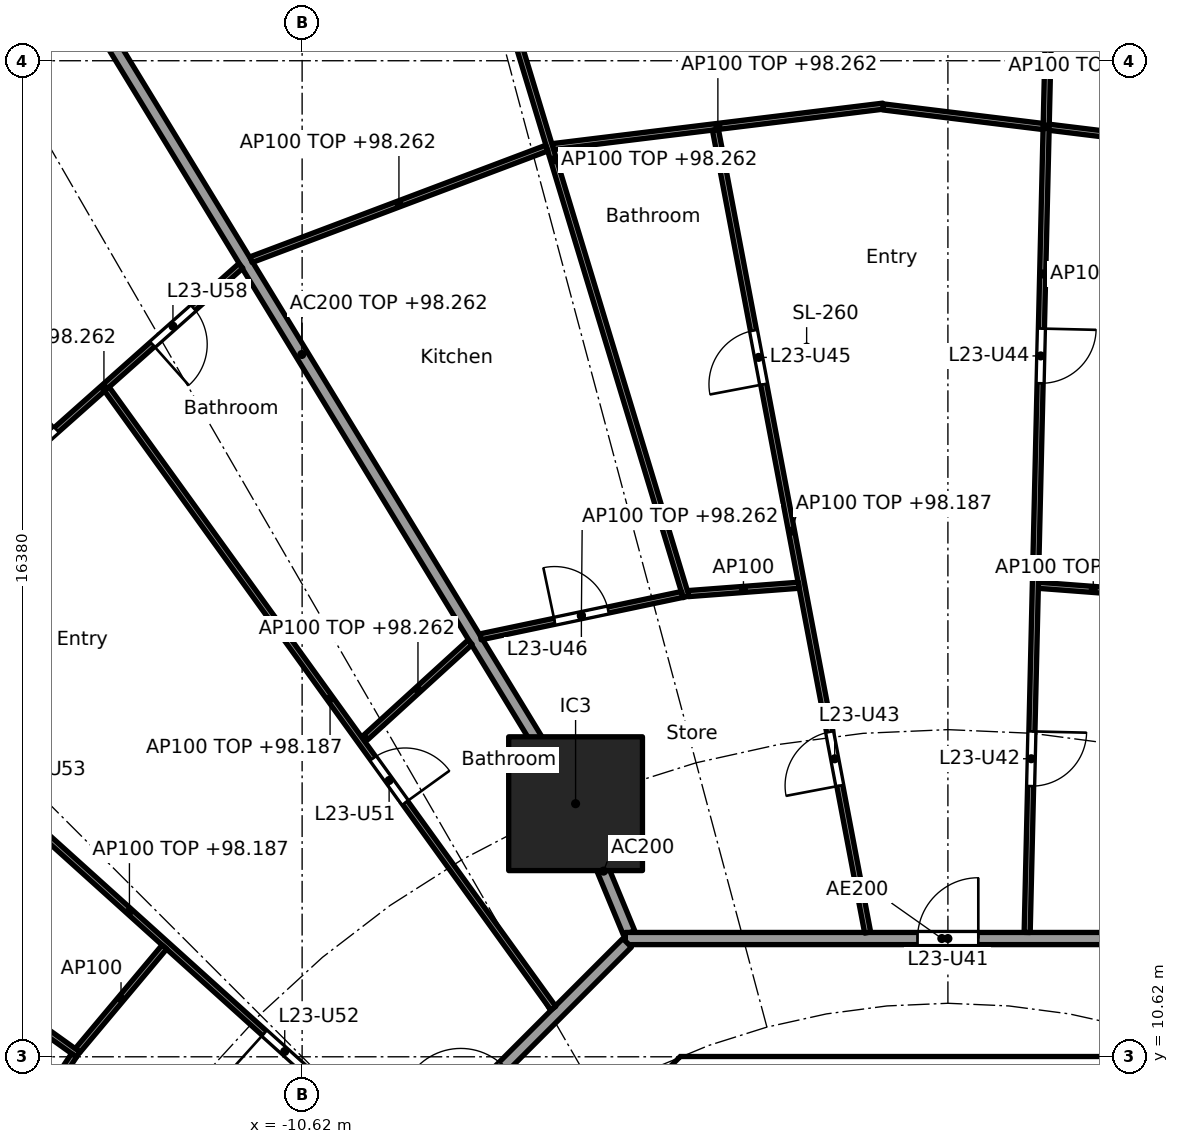
"""IFC4 building model, lengths in metres.
Left out: names, types, materials, properties, quantities, classifications, styles, units other than length and angle.
Written with IfcOpenShell. Run it as: python <this file> out.ifc"""

import sys

from ifc_helpers import new_model, si_unit, direction, frame, frame_2d, origin, origin_2d, place, context, subcontext, project, spatial, polyline, rectangle, outline, extrude, element, fill, save


model = new_model("IFC4")
c1 = context("Model", 3, precision=1e-05, world=origin(), true_north=direction((0.0, 1.0)))
c2 = subcontext(c1, "Body", "Model", "MODEL_VIEW")
j1 = project(units=[si_unit("LENGTHUNIT", "METRE"), si_unit("PLANEANGLEUNIT", "RADIAN")], contexts=[c1])
p1 = place(None, origin())
s1 = spatial("IfcSite", under=j1, at=p1, CompositionType="ELEMENT")
p2 = place(p1, origin())
s2 = spatial("IfcBuilding", under=s1, at=p2, CompositionType="ELEMENT")
p3 = place(p2, frame((0.0, 0.0, 95.5)))
s3 = spatial("IfcBuildingStorey", under=s2, at=p3, CompositionType="ELEMENT", Elevation=95.5)
p4 = place(p3, frame((-6.123, 14.782, 0.0), z_axis=(0.0, 0.0, 1.0), x_axis=(1.0, 0.0, 0.0)))
e1 = element("IfcColumn", 1, at=p4, inside=s3, PredefinedType="COLUMN", context=c2, shape_type="SweptSolid", body=[
    extrude(rectangle(XDim=2.2, YDim=2.2, at=origin_2d()), origin(), (0.0, 0.0, 1.0), 3.7),
])
p5 = place(p3, origin())
e2 = element("IfcWall", 2, at=p5, inside=s3, PredefinedType="SHEAR", context=c2, shape_type="SweptSolid", body=[
    extrude(outline(polyline([(-4.152, 10.025), (-4.401, 9.776), (-4.825, 10.2), (-4.401, 10.625), (4.401, 10.625), (4.825, 10.2), (4.401, 9.776), (4.152, 10.025), (-4.152, 10.025)])), origin(), (0.0, 0.0, 1.0), 3.44),
])
p6 = place(p3, frame((-5.243, 12.657, 0.0), z_axis=(0.0, 0.0, 1.0), x_axis=(-0.38273085373, 0.923859888513, 0.0)))
e3 = element("IfcWall", 3, at=p6, inside=s3, PredefinedType="PARTITIONING", context=c2, shape_type="SweptSolid", body=[
    extrude(rectangle(XDim=2.199, YDim=0.2, at=frame_2d((1.1, 0.0))), origin(), (0.0, 0.0, 1.0), 3.44),
])
p7 = place(p3, frame((-6.149, 14.825, 0.0), z_axis=(0.0, 0.0, 1.0), x_axis=(-0.520412862249, 0.853914780763, 0.0)))
e4 = element("IfcWall", 4, at=p7, inside=s3, PredefinedType="PARTITIONING", context=c2, shape_type="SweptSolid", body=[
    extrude(rectangle(XDim=17.202, YDim=0.2, at=frame_2d((8.601, 0.0))), origin(), (0.0, 0.0, 1.0), 2.762),
])
p8 = place(p3, frame((5.104, 12.565, 0.0), z_axis=(0.0, 0.0, 1.0), x_axis=(-1.0, 0.0, 0.0)))
e5 = element("IfcWall", 5, at=p8, inside=s3, PredefinedType="PARTITIONING", context=c2, shape_type="SweptSolid", body=[
    extrude(rectangle(XDim=10.409, YDim=0.2, at=frame_2d((5.205, 0.0))), origin(), (0.0, 0.0, 1.0), 3.44),
])
p9 = place(p8, frame((4.604, 0.0, 0.0)))
e6 = element("IfcOpeningElement", 6, at=p9, cuts=e5, PredefinedType="OPENING", context=c2, shape_type="SweptSolid", body=[
    extrude(rectangle(XDim=1.0, YDim=2.1, at=frame_2d((0.5, 1.05))), frame((0.0, 0.11, 0.0), z_axis=(0.0, -1.0, 0.0), x_axis=(1.0, 0.0, 0.0)), (0.0, 0.0, 1.0), 0.22),
])
p10 = place(p3, frame((-5.275, 12.494, 0.0), z_axis=(0.0, 0.0, 1.0), x_axis=(-0.707106781187, -0.707106781187, 0.0)))
e7 = element("IfcWall", 7, at=p10, inside=s3, PredefinedType="PARTITIONING", context=c2, shape_type="SweptSolid", body=[
    extrude(rectangle(XDim=10.209, YDim=0.2, at=frame_2d((5.104, 0.0))), origin(), (0.0, 0.0, 1.0), 3.44),
])
p11 = place(p10, frame((2.87, 0.0, 0.0)))
e8 = element("IfcOpeningElement", 8, at=p11, cuts=e7, PredefinedType="OPENING", context=c2, shape_type="SweptSolid", body=[
    extrude(rectangle(XDim=1.0, YDim=2.1, at=frame_2d((0.5, 1.05))), frame((0.0, 0.11, 0.0), z_axis=(0.0, -1.0, 0.0), x_axis=(1.0, 0.0, 0.0)), (0.0, 0.0, 1.0), 0.22),
])
p12 = place(p3, frame((3.299, 18.237, 0.0), z_axis=(0.0, 0.0, 1.0), x_axis=(-0.997152920483, 0.075405922664, 0.0)))
e9 = element("IfcWall", 9, at=p12, inside=s3, PredefinedType="PARTITIONING", context=c2, shape_type="SweptSolid", body=[
    extrude(rectangle(XDim=1.823, YDim=0.1, at=frame_2d((0.911, 0.0))), origin(), (0.0, 0.0, 1.0), 2.762),
])
p13 = place(p3, frame((4.267, 25.587, 0.0), z_axis=(0.0, 0.0, 1.0), x_axis=(-0.992576206119, 0.121624319302, 0.0)))
e10 = element("IfcWall", 10, at=p13, inside=s3, PredefinedType="PARTITIONING", context=c2, shape_type="SweptSolid", body=[
    extrude(rectangle(XDim=5.374, YDim=0.1, at=frame_2d((2.687, 0.0))), origin(), (0.0, 0.0, 1.0), 2.762),
])
p14 = place(p3, frame((1.303, 12.665, 0.0), z_axis=(0.0, 0.0, 1.0), x_axis=(0.023564110689, 0.999722327793, 0.0)))
e11 = element("IfcWall", 11, at=p14, inside=s3, PredefinedType="PARTITIONING", context=c2, shape_type="SweptSolid", body=[
    extrude(rectangle(XDim=21.664, YDim=0.1, at=frame_2d((10.832, 0.0))), origin(), (0.0, 0.0, 1.0), 2.687),
])
p15 = place(p14, frame((2.407, 0.0, 0.0)))
e12 = element("IfcOpeningElement", 12, at=p15, cuts=e11, PredefinedType="OPENING", context=c2, shape_type="SweptSolid", body=[
    extrude(rectangle(XDim=0.9, YDim=2.1, at=frame_2d((0.45, 1.05))), frame((0.0, 0.06, 0.0), z_axis=(0.0, -1.0, 0.0), x_axis=(1.0, 0.0, 0.0)), (0.0, 0.0, 1.0), 0.12),
])
p16 = place(p14, frame((9.034, 0.0, 0.0)))
e13 = element("IfcOpeningElement", 13, at=p16, cuts=e11, PredefinedType="OPENING", context=c2, shape_type="SweptSolid", body=[
    extrude(rectangle(XDim=0.9, YDim=2.1, at=frame_2d((0.45, 1.05))), frame((0.0, 0.06, 0.0), z_axis=(0.0, -1.0, 0.0), x_axis=(1.0, 0.0, 0.0)), (0.0, 0.0, 1.0), 0.12),
])
p17 = place(p14, frame((17.009, 0.0, 0.0)))
e14 = element("IfcOpeningElement", 14, at=p17, cuts=e11, PredefinedType="OPENING", context=c2, shape_type="SweptSolid", body=[
    extrude(rectangle(XDim=0.9, YDim=2.1, at=frame_2d((0.45, 1.05))), frame((0.0, 0.06, 0.0), z_axis=(0.0, -1.0, 0.0), x_axis=(1.0, 0.0, 0.0)), (0.0, 0.0, 1.0), 0.12),
])
p18 = place(p3, frame((-1.066, 26.253, 0.0), z_axis=(0.0, 0.0, 1.0), x_axis=(-0.992574853421, -0.121635358166, 0.0)))
e15 = element("IfcWall", 15, at=p18, inside=s3, PredefinedType="PARTITIONING", context=c2, shape_type="SweptSolid", body=[
    extrude(rectangle(XDim=5.473, YDim=0.1, at=frame_2d((2.737, 0.0))), origin(), (0.0, 0.0, 1.0), 2.762),
])
p19 = place(p3, frame((-1.32, 12.663, 0.0), z_axis=(0.0, 0.0, 1.0), x_axis=(-0.186308855238, 0.982491226658, 0.0)))
e16 = element("IfcWall", 16, at=p19, inside=s3, PredefinedType="PARTITIONING", context=c2, shape_type="SweptSolid", body=[
    extrude(rectangle(XDim=13.437, YDim=0.1, at=frame_2d((6.719, 0.0))), origin(), (0.0, 0.0, 1.0), 2.687),
])
p20 = place(p19, frame((2.458, 0.0, 0.0)))
e17 = element("IfcOpeningElement", 17, at=p20, cuts=e16, PredefinedType="OPENING", context=c2, shape_type="SweptSolid", body=[
    extrude(rectangle(XDim=0.9, YDim=2.1, at=frame_2d((0.45, 1.05))), frame((0.0, 0.06, 0.0), z_axis=(0.0, -1.0, 0.0), x_axis=(1.0, 0.0, 0.0)), (0.0, 0.0, 1.0), 0.12),
])
p21 = place(p19, frame((9.177, 0.0, 0.0)))
e18 = element("IfcOpeningElement", 18, at=p21, cuts=e16, PredefinedType="OPENING", context=c2, shape_type="SweptSolid", body=[
    extrude(rectangle(XDim=0.9, YDim=2.1, at=frame_2d((0.45, 1.05))), frame((0.0, 0.06, 0.0), z_axis=(0.0, -1.0, 0.0), x_axis=(1.0, 0.0, 0.0)), (0.0, 0.0, 1.0), 0.12),
])
p22 = place(p3, frame((-2.453, 18.374, 0.0), z_axis=(0.0, 0.0, 1.0), x_axis=(-0.997153681897, -0.075395853197, 0.0)))
e19 = element("IfcWall", 19, at=p22, inside=s3, PredefinedType="PARTITIONING", context=c2, shape_type="SweptSolid", body=[
    extrude(rectangle(XDim=1.823, YDim=0.1, at=frame_2d((0.912, 0.0))), origin(), (0.0, 0.0, 1.0), 3.44),
])
p23 = place(p3, frame((-4.306, 18.185, 0.0), z_axis=(0.0, 0.0, 1.0), x_axis=(-0.290183838394, 0.956970919064, 0.0)))
e20 = element("IfcWall", 20, at=p23, inside=s3, PredefinedType="PARTITIONING", context=c2, shape_type="SweptSolid", body=[
    extrude(rectangle(XDim=15.015, YDim=0.1, at=frame_2d((7.508, 0.0))), origin(), (0.0, 0.0, 1.0), 2.762),
])
p24 = place(p23, frame((10.922, 0.0, 0.0)))
e21 = element("IfcOpeningElement", 21, at=p24, cuts=e20, PredefinedType="OPENING", context=c2, shape_type="SweptSolid", body=[
    extrude(rectangle(XDim=0.9, YDim=2.1, at=frame_2d((0.45, 1.05))), frame((0.0, 0.06, 0.0), z_axis=(0.0, -1.0, 0.0), x_axis=(1.0, 0.0, 0.0)), (0.0, 0.0, 1.0), 0.12),
])
p25 = place(p3, frame((-4.37, 18.223, 0.0), z_axis=(0.0, 0.0, 1.0), x_axis=(-0.978633053291, -0.205614559323, 0.0)))
e22 = element("IfcWall", 22, at=p25, inside=s3, PredefinedType="PARTITIONING", context=c2, shape_type="SweptSolid", body=[
    extrude(rectangle(XDim=3.387, YDim=0.1, at=frame_2d((1.694, 0.0))), origin(), (0.0, 0.0, 1.0), 2.762),
])
p26 = place(p25, frame((1.244, 0.0, 0.0)))
e23 = element("IfcOpeningElement", 23, at=p26, cuts=e22, PredefinedType="OPENING", context=c2, shape_type="SweptSolid", body=[
    extrude(rectangle(XDim=0.9, YDim=2.1, at=frame_2d((0.45, 1.05))), frame((0.0, 0.06, 0.0), z_axis=(0.0, -1.0, 0.0), x_axis=(1.0, 0.0, 0.0)), (0.0, 0.0, 1.0), 0.12),
])
p27 = place(p3, frame((-6.596, 25.563, 0.0), z_axis=(0.0, 0.0, 1.0), x_axis=(-0.935624838262, -0.352995980185, 0.0)))
e24 = element("IfcWall", 24, at=p27, inside=s3, PredefinedType="PARTITIONING", context=c2, shape_type="SweptSolid", body=[
    extrude(rectangle(XDim=5.199, YDim=0.1, at=frame_2d((2.6, 0.0))), origin(), (0.0, 0.0, 1.0), 2.762),
])
p28 = place(p3, frame((-7.857, 17.438, 0.0), z_axis=(0.0, 0.0, 1.0), x_axis=(-0.738883513135, -0.673833179665, 0.0)))
e25 = element("IfcWall", 25, at=p28, inside=s3, PredefinedType="PARTITIONING", context=c2, shape_type="SweptSolid", body=[
    extrude(rectangle(XDim=2.323, YDim=0.1, at=frame_2d((1.162, 0.0))), origin(), (0.0, 0.0, 1.0), 2.762),
])
p29 = place(p3, frame((-11.628, 23.626, 0.0), z_axis=(0.0, 0.0, 1.0), x_axis=(-0.747429444005, -0.664341197153, 0.0)))
e26 = element("IfcWall", 26, at=p29, inside=s3, PredefinedType="PARTITIONING", context=c2, shape_type="SweptSolid", body=[
    extrude(rectangle(XDim=6.024, YDim=0.1, at=frame_2d((3.012, 0.0))), origin(), (0.0, 0.0, 1.0), 2.762),
])
p30 = place(p29, frame((4.055, 0.0, 0.0)))
e27 = element("IfcOpeningElement", 27, at=p30, cuts=e26, PredefinedType="OPENING", context=c2, shape_type="SweptSolid", body=[
    extrude(rectangle(XDim=0.9, YDim=2.1, at=frame_2d((0.45, 1.05))), frame((0.0, 0.06, 0.0), z_axis=(0.0, -1.0, 0.0), x_axis=(1.0, 0.0, 0.0)), (0.0, 0.0, 1.0), 0.12),
])
p31 = place(p29, frame((1.043, 0.0, 0.0)))
e28 = element("IfcOpeningElement", 28, at=p31, cuts=e26, PredefinedType="OPENING", context=c2, shape_type="SweptSolid", body=[
    extrude(rectangle(XDim=0.9, YDim=2.1, at=frame_2d((0.45, 1.05))), frame((0.0, 0.06, 0.0), z_axis=(0.0, -1.0, 0.0), x_axis=(1.0, 0.0, 0.0)), (0.0, 0.0, 1.0), 0.12),
])
p32 = place(p3, frame((-6.49, 11.419, 0.0), z_axis=(0.0, 0.0, 1.0), x_axis=(-0.584832823883, 0.811153849839, 0.0)))
e29 = element("IfcWall", 29, at=p32, inside=s3, PredefinedType="PARTITIONING", context=c2, shape_type="SweptSolid", body=[
    extrude(rectangle(XDim=12.553, YDim=0.1, at=frame_2d((6.277, 0.0))), origin(), (0.0, 0.0, 1.0), 2.687),
])
p33 = place(p32, frame((4.166, 0.0, 0.0)))
e30 = element("IfcOpeningElement", 30, at=p33, cuts=e29, PredefinedType="OPENING", context=c2, shape_type="SweptSolid", body=[
    extrude(rectangle(XDim=0.9, YDim=2.1, at=frame_2d((0.45, 1.05))), frame((0.0, 0.06, 0.0), z_axis=(0.0, -1.0, 0.0), x_axis=(1.0, 0.0, 0.0)), (0.0, 0.0, 1.0), 0.12),
])
p34 = place(p3, frame((-8.959, 8.952, 0.0), z_axis=(0.0, 0.0, 1.0), x_axis=(-0.742679904999, 0.669646592398, 0.0)))
e31 = element("IfcWall", 31, at=p34, inside=s3, PredefinedType="PARTITIONING", context=c2, shape_type="SweptSolid", body=[
    extrude(rectangle(XDim=12.121, YDim=0.1, at=frame_2d((6.061, 0.0))), origin(), (0.0, 0.0, 1.0), 2.687),
])
p35 = place(p34, frame((2.172, 0.0, 0.0)))
e32 = element("IfcOpeningElement", 32, at=p35, cuts=e31, PredefinedType="OPENING", context=c2, shape_type="SweptSolid", body=[
    extrude(rectangle(XDim=0.9, YDim=2.1, at=frame_2d((0.45, 1.05))), frame((0.0, 0.06, 0.0), z_axis=(0.0, -1.0, 0.0), x_axis=(1.0, 0.0, 0.0)), (0.0, 0.0, 1.0), 0.12),
])
p36 = place(p34, frame((8.233, 0.0, 0.0)))
e33 = element("IfcOpeningElement", 33, at=p36, cuts=e31, PredefinedType="OPENING", context=c2, shape_type="SweptSolid", body=[
    extrude(rectangle(XDim=0.9, YDim=2.1, at=frame_2d((0.45, 1.05))), frame((0.0, 0.06, 0.0), z_axis=(0.0, -1.0, 0.0), x_axis=(1.0, 0.0, 0.0)), (0.0, 0.0, 1.0), 0.12),
])
p37 = place(p3, frame((-12.885, 12.425, 0.0), z_axis=(0.0, 0.0, 1.0), x_axis=(-0.642551826067, -0.766242227248, 0.0)))
e34 = element("IfcWall", 34, at=p37, inside=s3, PredefinedType="PARTITIONING", context=c2, shape_type="SweptSolid", body=[
    extrude(rectangle(XDim=2.219, YDim=0.1, at=frame_2d((1.109, 0.0))), origin(), (0.0, 0.0, 1.0), 3.44),
])
p38 = place(p3, frame((-14.302, 10.657, 0.0), z_axis=(0.0, 0.0, 1.0), x_axis=(-0.813183002698, 0.582008079087, 0.0)))
e35 = element("IfcWall", 35, at=p38, inside=s3, PredefinedType="PARTITIONING", context=c2, shape_type="SweptSolid", body=[
    extrude(rectangle(XDim=13.074, YDim=0.1, at=frame_2d((6.537, 0.0))), origin(), (0.0, 0.0, 1.0), 2.762),
])
p39 = place(p38, frame((9.485, 0.0, 0.0)))
e36 = element("IfcOpeningElement", 36, at=p39, cuts=e35, PredefinedType="OPENING", context=c2, shape_type="SweptSolid", body=[
    extrude(rectangle(XDim=0.9, YDim=2.1, at=frame_2d((0.45, 1.05))), frame((0.0, 0.06, 0.0), z_axis=(0.0, -1.0, 0.0), x_axis=(1.0, 0.0, 0.0)), (0.0, 0.0, 1.0), 0.12),
])
p40 = place(p3, frame((-14.371, 10.645, 0.0), z_axis=(0.0, 0.0, 1.0), x_axis=(-0.553341009285, -0.832954817168, 0.0)))
e37 = element("IfcWall", 37, at=p40, inside=s3, PredefinedType="PARTITIONING", context=c2, shape_type="SweptSolid", body=[
    extrude(rectangle(XDim=4.396, YDim=0.1, at=frame_2d((2.198, 0.0))), origin(), (0.0, 0.0, 1.0), 2.762),
])
p41 = place(p40, frame((1.469, 0.0, 0.0)))
e38 = element("IfcOpeningElement", 38, at=p41, cuts=e37, PredefinedType="OPENING", context=c2, shape_type="SweptSolid", body=[
    extrude(rectangle(XDim=0.9, YDim=2.1, at=frame_2d((0.45, 1.05))), frame((0.0, 0.06, 0.0), z_axis=(0.0, -1.0, 0.0), x_axis=(1.0, 0.0, 0.0)), (0.0, 0.0, 1.0), 0.12),
])
p42 = place(p9, frame((1.0, 0.0, 0.0), x_axis=(-1.0, 0.0, 0.0)))
e39 = element("IfcDoor", 39, at=p42, inside=s3, OperationType="SINGLE_SWING_RIGHT", PredefinedType="DOOR", context=c2, shape_type="SweptSolid", body=[
    extrude(rectangle(XDim=1.0, YDim=2.1, at=frame_2d((0.5, 1.05))), frame((0.0, 0.025, 0.0), z_axis=(0.0, -1.0, 0.0), x_axis=(1.0, 0.0, 0.0)), (0.0, 0.0, 1.0), 0.05),
])
fill(e6, e39)
p43 = place(p15, frame((0.9, 0.0, 0.0), x_axis=(-1.0, 0.0, 0.0)))
e40 = element("IfcDoor", 40, at=p43, inside=s3, OperationType="SINGLE_SWING_LEFT", PredefinedType="DOOR", context=c2, shape_type="SweptSolid", body=[
    extrude(rectangle(XDim=0.9, YDim=2.1, at=frame_2d((0.45, 1.05))), frame((0.0, 0.025, 0.0), z_axis=(0.0, -1.0, 0.0), x_axis=(1.0, 0.0, 0.0)), (0.0, 0.0, 1.0), 0.05),
])
fill(e12, e40)
p44 = place(p20, origin())
e41 = element("IfcDoor", 41, at=p44, inside=s3, OperationType="SINGLE_SWING_LEFT", PredefinedType="DOOR", context=c2, shape_type="SweptSolid", body=[
    extrude(rectangle(XDim=0.9, YDim=2.1, at=frame_2d((0.45, 1.05))), frame((0.0, 0.025, 0.0), z_axis=(0.0, -1.0, 0.0), x_axis=(1.0, 0.0, 0.0)), (0.0, 0.0, 1.0), 0.05),
])
fill(e17, e41)
p45 = place(p16, frame((0.9, 0.0, 0.0), x_axis=(-1.0, 0.0, 0.0)))
e42 = element("IfcDoor", 42, at=p45, inside=s3, OperationType="SINGLE_SWING_LEFT", PredefinedType="DOOR", context=c2, shape_type="SweptSolid", body=[
    extrude(rectangle(XDim=0.9, YDim=2.1, at=frame_2d((0.45, 1.05))), frame((0.0, 0.025, 0.0), z_axis=(0.0, -1.0, 0.0), x_axis=(1.0, 0.0, 0.0)), (0.0, 0.0, 1.0), 0.05),
])
fill(e13, e42)
p46 = place(p21, origin())
e43 = element("IfcDoor", 43, at=p46, inside=s3, OperationType="SINGLE_SWING_LEFT", PredefinedType="DOOR", context=c2, shape_type="SweptSolid", body=[
    extrude(rectangle(XDim=0.9, YDim=2.1, at=frame_2d((0.45, 1.05))), frame((0.0, 0.025, 0.0), z_axis=(0.0, -1.0, 0.0), x_axis=(1.0, 0.0, 0.0)), (0.0, 0.0, 1.0), 0.05),
])
fill(e18, e43)
p47 = place(p26, frame((0.9, 0.0, 0.0), x_axis=(-1.0, 0.0, 0.0)))
e44 = element("IfcDoor", 44, at=p47, inside=s3, OperationType="SINGLE_SWING_LEFT", PredefinedType="DOOR", context=c2, shape_type="SweptSolid", body=[
    extrude(rectangle(XDim=0.9, YDim=2.1, at=frame_2d((0.45, 1.05))), frame((0.0, 0.025, 0.0), z_axis=(0.0, -1.0, 0.0), x_axis=(1.0, 0.0, 0.0)), (0.0, 0.0, 1.0), 0.05),
])
fill(e23, e44)
p48 = place(p33, frame((0.9, 0.0, 0.0), x_axis=(-1.0, 0.0, 0.0)))
e45 = element("IfcDoor", 45, at=p48, inside=s3, OperationType="SINGLE_SWING_RIGHT", PredefinedType="DOOR", context=c2, shape_type="SweptSolid", body=[
    extrude(rectangle(XDim=0.9, YDim=2.1, at=frame_2d((0.45, 1.05))), frame((0.0, 0.025, 0.0), z_axis=(0.0, -1.0, 0.0), x_axis=(1.0, 0.0, 0.0)), (0.0, 0.0, 1.0), 0.05),
])
fill(e30, e45)
p49 = place(p35, origin())
e46 = element("IfcDoor", 46, at=p49, inside=s3, OperationType="SINGLE_SWING_RIGHT", PredefinedType="DOOR", context=c2, shape_type="SweptSolid", body=[
    extrude(rectangle(XDim=0.9, YDim=2.1, at=frame_2d((0.45, 1.05))), frame((0.0, 0.025, 0.0), z_axis=(0.0, -1.0, 0.0), x_axis=(1.0, 0.0, 0.0)), (0.0, 0.0, 1.0), 0.05),
])
fill(e32, e46)
p50 = place(p30, frame((0.9, 0.0, 0.0), x_axis=(-1.0, 0.0, 0.0)))
e47 = element("IfcDoor", 47, at=p50, inside=s3, OperationType="SINGLE_SWING_RIGHT", PredefinedType="DOOR", context=c2, shape_type="SweptSolid", body=[
    extrude(rectangle(XDim=0.9, YDim=2.1, at=frame_2d((0.45, 1.05))), frame((0.0, 0.025, 0.0), z_axis=(0.0, -1.0, 0.0), x_axis=(1.0, 0.0, 0.0)), (0.0, 0.0, 1.0), 0.05),
])
fill(e27, e47)
p51 = place(p31, origin())
e48 = element("IfcDoor", 48, at=p51, inside=s3, OperationType="SINGLE_SWING_RIGHT", PredefinedType="DOOR", context=c2, shape_type="SweptSolid", body=[
    extrude(rectangle(XDim=0.9, YDim=2.1, at=frame_2d((0.45, 1.05))), frame((0.0, 0.025, 0.0), z_axis=(0.0, -1.0, 0.0), x_axis=(1.0, 0.0, 0.0)), (0.0, 0.0, 1.0), 0.05),
])
fill(e28, e48)
save(model, sys.argv[1])
